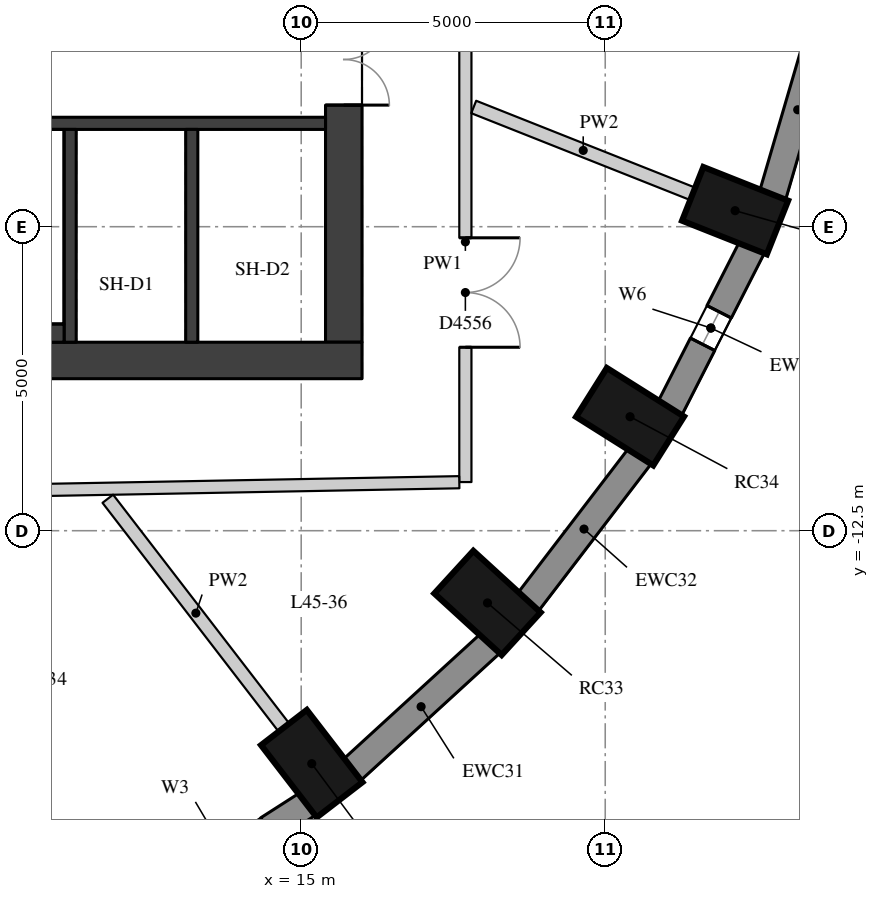
"""IFC4 building model, lengths in metres.
Left out: names, types, materials, properties, quantities, classifications, styles, units other than length and angle.
Written with IfcOpenShell. Run it as: python <this file> out.ifc"""

import sys

from ifc_helpers import new_model, si_unit, direction, frame, frame_2d, origin, origin_2d, place, context, subcontext, project, spatial, rectangle, extrude, element, fill, save


model = new_model("IFC4")
c1 = context("Model", 3, precision=1e-05, world=origin(), true_north=direction((0.0, 1.0)))
c2 = subcontext(c1, "Body", "Model", "MODEL_VIEW")
j1 = project(units=[si_unit("LENGTHUNIT", "METRE"), si_unit("PLANEANGLEUNIT", "RADIAN")], contexts=[c1])
p1 = place(None, origin())
s1 = spatial("IfcSite", under=j1, at=p1, CompositionType="ELEMENT")
p2 = place(p1, origin())
s2 = spatial("IfcBuilding", under=s1, at=p2, CompositionType="ELEMENT")
p3 = place(p2, frame((0.0, 0.0, 161.6)))
s3 = spatial("IfcBuildingStorey", under=s2, at=p3, CompositionType="ELEMENT", Elevation=161.6)
for number, where, z_axis, x_axis in (
    (1, (15.173, -16.332, 0.0), (0.0, 0.0, 1.0), (0.61, -0.792, 0.0)),
    (2, (18.064, -13.688, 0.0), (0.0, 0.0, 1.0), (0.738, -0.675, 0.0)),
    (3, (20.408, -10.625, 0.0), (0.0, 0.0, 1.0), (0.846, -0.533, 0.0)),
    (4, (22.136, -7.236, 0.0), (0.0, 0.0, 1.0), (0.93, -0.369, 0.0)),
):
    element("IfcColumn", number, at=place(p3, frame(where, z_axis=z_axis, x_axis=x_axis)), inside=s3, PredefinedType="COLUMN", context=c2, shape_type="SweptSolid", body=[
        extrude(rectangle(XDim=1.5, YDim=0.95, at=origin_2d()), origin(), (0.0, 0.0, 1.0), 3.3),
    ])
p4 = place(p3, frame((12.455, -18.693, 0.0), z_axis=(0.0, 0.0, 1.0), x_axis=(0.842065914439, 0.539374633943, 0.0)))
e5 = element("IfcWall", 5, at=p4, inside=s3, PredefinedType="SOLIDWALL", context=c2, shape_type="SweptSolid", body=[
    extrude(rectangle(XDim=3.151, YDim=0.45, at=frame_2d((1.576, 0.0))), origin(), (0.0, 0.0, 1.0), 3.02),
])
p5 = place(p4, frame((0.776, 0.0, 0.4)))
e6 = element("IfcOpeningElement", 6, at=p5, cuts=e5, PredefinedType="OPENING", context=c2, shape_type="SweptSolid", body=[
    extrude(rectangle(XDim=1.6, YDim=1.75, at=frame_2d((0.8, 0.875))), frame((0.0, 0.235, 0.0), z_axis=(0.0, -1.0, 0.0), x_axis=(1.0, 0.0, 0.0)), (0.0, 0.0, 1.0), 0.47),
])
p6 = place(p3, frame((15.83, -16.439, 0.0), z_axis=(0.0, 0.0, 1.0), x_axis=(0.737808755941, 0.675009807082, 0.0)))
e7 = element("IfcWall", 7, at=p6, inside=s3, PredefinedType="SOLIDWALL", context=c2, shape_type="SweptSolid", body=[
    extrude(rectangle(XDim=3.094, YDim=0.45, at=frame_2d((1.547, 0.0))), origin(), (0.0, 0.0, 1.0), 3.02),
])
p7 = place(p3, frame((18.728, -13.679, 0.0), z_axis=(0.0, 0.0, 1.0), x_axis=(0.607817056371, 0.794077090706, 0.0)))
e8 = element("IfcWall", 8, at=p7, inside=s3, PredefinedType="SOLIDWALL", context=c2, shape_type="SweptSolid", body=[
    extrude(rectangle(XDim=3.037, YDim=0.45, at=frame_2d((1.519, 0.0))), origin(), (0.0, 0.0, 1.0), 3.02),
])
p8 = place(p3, frame((21.059, -10.497, 0.0), z_axis=(0.0, 0.0, 1.0), x_axis=(0.454133999889, 0.890933392653, 0.0)))
e9 = element("IfcWall", 9, at=p8, inside=s3, PredefinedType="SOLIDWALL", context=c2, shape_type="SweptSolid", body=[
    extrude(rectangle(XDim=2.986, YDim=0.45, at=frame_2d((1.493, 0.0))), origin(), (0.0, 0.0, 1.0), 3.02),
])
p9 = place(p8, frame((1.193, 0.0, 0.4)))
e10 = element("IfcOpeningElement", 10, at=p9, cuts=e9, PredefinedType="OPENING", context=c2, shape_type="SweptSolid", body=[
    extrude(rectangle(XDim=0.6, YDim=1.75, at=frame_2d((0.3, 0.875))), frame((0.0, 0.235, 0.0), z_axis=(0.0, -1.0, 0.0), x_axis=(1.0, 0.0, 0.0)), (0.0, 0.0, 1.0), 0.47),
])
p10 = place(p3, frame((22.751, -6.991, 0.0), z_axis=(0.0, 0.0, 1.0), x_axis=(0.281049481624, 0.959693278542, 0.0)))
e11 = element("IfcWall", 11, at=p10, inside=s3, PredefinedType="SOLIDWALL", context=c2, shape_type="SweptSolid", body=[
    extrude(rectangle(XDim=2.948, YDim=0.45, at=frame_2d((1.474, 0.0))), origin(), (0.0, 0.0, 1.0), 3.02),
])
p11 = place(p3, frame((15.7, -9.4, 0.0), z_axis=(0.0, 0.0, 1.0), x_axis=(0.0, 1.0, 0.0)))
e12 = element("IfcWall", 12, at=p11, inside=s3, PredefinedType="SHEAR", context=c2, shape_type="SweptSolid", body=[
    extrude(rectangle(XDim=18.8, YDim=0.6, at=frame_2d((9.4, 0.0))), origin(), (0.0, 0.0, 1.0), 3.02),
])
p12 = place(p11, frame((13.4, 0.0, 0.0)))
e13 = element("IfcOpeningElement", 13, at=p12, cuts=e12, PredefinedType="OPENING", context=c2, shape_type="SweptSolid", body=[
    extrude(rectangle(XDim=1.5, YDim=2.1, at=frame_2d((0.75, 1.05))), frame((0.0, 0.31, 0.0), z_axis=(0.0, -1.0, 0.0), x_axis=(1.0, 0.0, 0.0)), (0.0, 0.0, 1.0), 0.62),
])
p13 = place(p11, frame((3.9, 0.0, 0.0)))
e14 = element("IfcOpeningElement", 14, at=p13, cuts=e12, PredefinedType="OPENING", context=c2, shape_type="SweptSolid", body=[
    extrude(rectangle(XDim=1.5, YDim=2.1, at=frame_2d((0.75, 1.05))), frame((0.0, 0.31, 0.0), z_axis=(0.0, -1.0, 0.0), x_axis=(1.0, 0.0, 0.0)), (0.0, 0.0, 1.0), 0.62),
])
p14 = place(p3, frame((4.0, -9.7, 0.0), z_axis=(0.0, 0.0, 1.0), x_axis=(1.0, 0.0, 0.0)))
e15 = element("IfcWall", 15, at=p14, inside=s3, PredefinedType="SHEAR", context=c2, shape_type="SweptSolid", body=[
    extrude(rectangle(XDim=12.0, YDim=0.6, at=frame_2d((6.0, 0.0))), origin(), (0.0, 0.0, 1.0), 3.02),
])
p15 = place(p3, frame((4.6, -5.8, 0.0), z_axis=(0.0, 0.0, 1.0), x_axis=(1.0, 0.0, 0.0)))
e16 = element("IfcWall", 16, at=p15, inside=s3, PredefinedType="SHEAR", context=c2, shape_type="SweptSolid", body=[
    extrude(rectangle(XDim=10.8, YDim=0.2, at=frame_2d((5.4, 0.0))), origin(), (0.0, 0.0, 1.0), 3.02),
])
for number, where, z_axis, x_axis in (
    (17, (11.2, -9.4, 0.0), (0.0, 0.0, 1.0), (0.0, 1.0, 0.0)),
    (18, (13.2, -9.4, 0.0), (0.0, 0.0, 1.0), (0.0, 1.0, 0.0)),
):
    element("IfcWall", number, at=place(p3, frame(where, z_axis=z_axis, x_axis=x_axis)), inside=s3, PredefinedType="SHEAR", context=c2, shape_type="SweptSolid", body=[
        extrude(rectangle(XDim=3.5, YDim=0.2, at=frame_2d((1.75, 0.0))), origin(), (0.0, 0.0, 1.0), 3.02),
    ])
p16 = place(p3, frame((6.22, -9.25, 0.0), z_axis=(0.0, 0.0, 1.0), x_axis=(1.0, 0.0, 0.0)))
e19 = element("IfcWall", 19, at=p16, inside=s3, PredefinedType="PARTITIONING", context=c2, shape_type="SweptSolid", body=[
    extrude(rectangle(XDim=4.88, YDim=0.3, at=frame_2d((2.44, 0.0))), origin(), (0.0, 0.0, 1.0), 3.02),
])
p17 = place(p3, frame((17.7, -3.8, 0.0), z_axis=(0.0, 0.0, 1.0), x_axis=(0.0, -1.0, 0.0)))
e20 = element("IfcWall", 20, at=p17, inside=s3, PredefinedType="PARTITIONING", context=c2, shape_type="SweptSolid", body=[
    extrude(rectangle(XDim=7.9, YDim=0.2, at=frame_2d((3.95, 0.0))), origin(), (0.0, 0.0, 1.0), 3.02),
])
p18 = place(p17, frame((3.883, 0.0, 0.0)))
e21 = element("IfcOpeningElement", 21, at=p18, cuts=e20, PredefinedType="OPENING", context=c2, shape_type="SweptSolid", body=[
    extrude(rectangle(XDim=1.8, YDim=2.1, at=frame_2d((0.9, 1.05))), frame((0.0, 0.11, 0.0), z_axis=(0.0, -1.0, 0.0), x_axis=(1.0, 0.0, 0.0)), (0.0, 0.0, 1.0), 0.22),
])
p19 = place(p3, frame((17.6, -11.702, 0.0), z_axis=(0.0, 0.0, 1.0), x_axis=(-0.999825923551, -0.018658043723, 0.0)))
e22 = element("IfcWall", 22, at=p19, inside=s3, PredefinedType="PARTITIONING", context=c2, shape_type="SweptSolid", body=[
    extrude(rectangle(XDim=22.899, YDim=0.2, at=frame_2d((11.449, 0.0))), origin(), (0.0, 0.0, 1.0), 3.02),
])
p20 = place(p19, frame((20.729, 0.0, 0.0)))
e23 = element("IfcOpeningElement", 23, at=p20, cuts=e22, PredefinedType="OPENING", context=c2, shape_type="SweptSolid", body=[
    extrude(rectangle(XDim=1.8, YDim=2.1, at=frame_2d((0.9, 1.05))), frame((0.0, 0.11, 0.0), z_axis=(0.0, -1.0, 0.0), x_axis=(1.0, 0.0, 0.0)), (0.0, 0.0, 1.0), 0.22),
])
p21 = place(p19, frame((14.554, 0.0, 0.0)))
e24 = element("IfcOpeningElement", 24, at=p21, cuts=e22, PredefinedType="OPENING", context=c2, shape_type="SweptSolid", body=[
    extrude(rectangle(XDim=1.1, YDim=2.1, at=frame_2d((0.55, 1.05))), frame((0.0, 0.11, 0.0), z_axis=(0.0, -1.0, 0.0), x_axis=(1.0, 0.0, 0.0)), (0.0, 0.0, 1.0), 0.22),
])
p22 = place(p19, frame((8.491, 0.0, 0.0)))
e25 = element("IfcOpeningElement", 25, at=p22, cuts=e22, PredefinedType="OPENING", context=c2, shape_type="SweptSolid", body=[
    extrude(rectangle(XDim=1.1, YDim=2.1, at=frame_2d((0.55, 1.05))), frame((0.0, 0.11, 0.0), z_axis=(0.0, -1.0, 0.0), x_axis=(1.0, 0.0, 0.0)), (0.0, 0.0, 1.0), 0.22),
])
p23 = place(p3, frame((14.716, -15.737, 0.0), z_axis=(0.0, 0.0, 1.0), x_axis=(-0.609964163419, 0.79242899956, 0.0)))
e26 = element("IfcWall", 26, at=p23, inside=s3, PredefinedType="PARTITIONING", context=c2, shape_type="SweptSolid", body=[
    extrude(rectangle(XDim=4.749, YDim=0.22, at=frame_2d((2.374, 0.0))), origin(), (0.0, 0.0, 1.0), 3.02),
])
p24 = place(p3, frame((21.439, -6.96, 0.0), z_axis=(0.0, 0.0, 1.0), x_axis=(-0.929511625875, 0.36879281089, 0.0)))
e27 = element("IfcWall", 27, at=p24, inside=s3, PredefinedType="PARTITIONING", context=c2, shape_type="SweptSolid", body=[
    extrude(rectangle(XDim=3.875, YDim=0.22, at=frame_2d((1.938, 0.0))), origin(), (0.0, 0.0, 1.0), 3.02),
])
p25 = place(p9, origin())
e28 = element("IfcWindow", 28, at=p25, inside=s3, PartitioningType="SINGLE_PANEL", PredefinedType="WINDOW", context=c2, shape_type="SweptSolid", body=[
    extrude(rectangle(XDim=0.6, YDim=1.75, at=frame_2d((0.3, 0.875))), frame((0.0, 0.035, 0.0), z_axis=(0.0, -1.0, 0.0), x_axis=(1.0, 0.0, 0.0)), (0.0, 0.0, 1.0), 0.06),
])
fill(e10, e28)
p26 = place(p13, origin())
e29 = element("IfcDoor", 29, at=p26, inside=s3, OperationType="DOUBLE_DOOR_SINGLE_SWING", PredefinedType="DOOR", context=c2, shape_type="SweptSolid", body=[
    extrude(rectangle(XDim=1.5, YDim=2.1, at=frame_2d((0.75, 1.05))), frame((0.0, 0.025, 0.0), z_axis=(0.0, -1.0, 0.0), x_axis=(1.0, 0.0, 0.0)), (0.0, 0.0, 1.0), 0.05),
])
fill(e14, e29)
p27 = place(p18, origin())
e30 = element("IfcDoor", 30, at=p27, inside=s3, OperationType="DOUBLE_DOOR_SINGLE_SWING", PredefinedType="DOOR", context=c2, shape_type="SweptSolid", body=[
    extrude(rectangle(XDim=1.8, YDim=2.1, at=frame_2d((0.9, 1.05))), frame((0.0, 0.025, 0.0), z_axis=(0.0, -1.0, 0.0), x_axis=(1.0, 0.0, 0.0)), (0.0, 0.0, 1.0), 0.05),
])
fill(e21, e30)
save(model, sys.argv[1])
